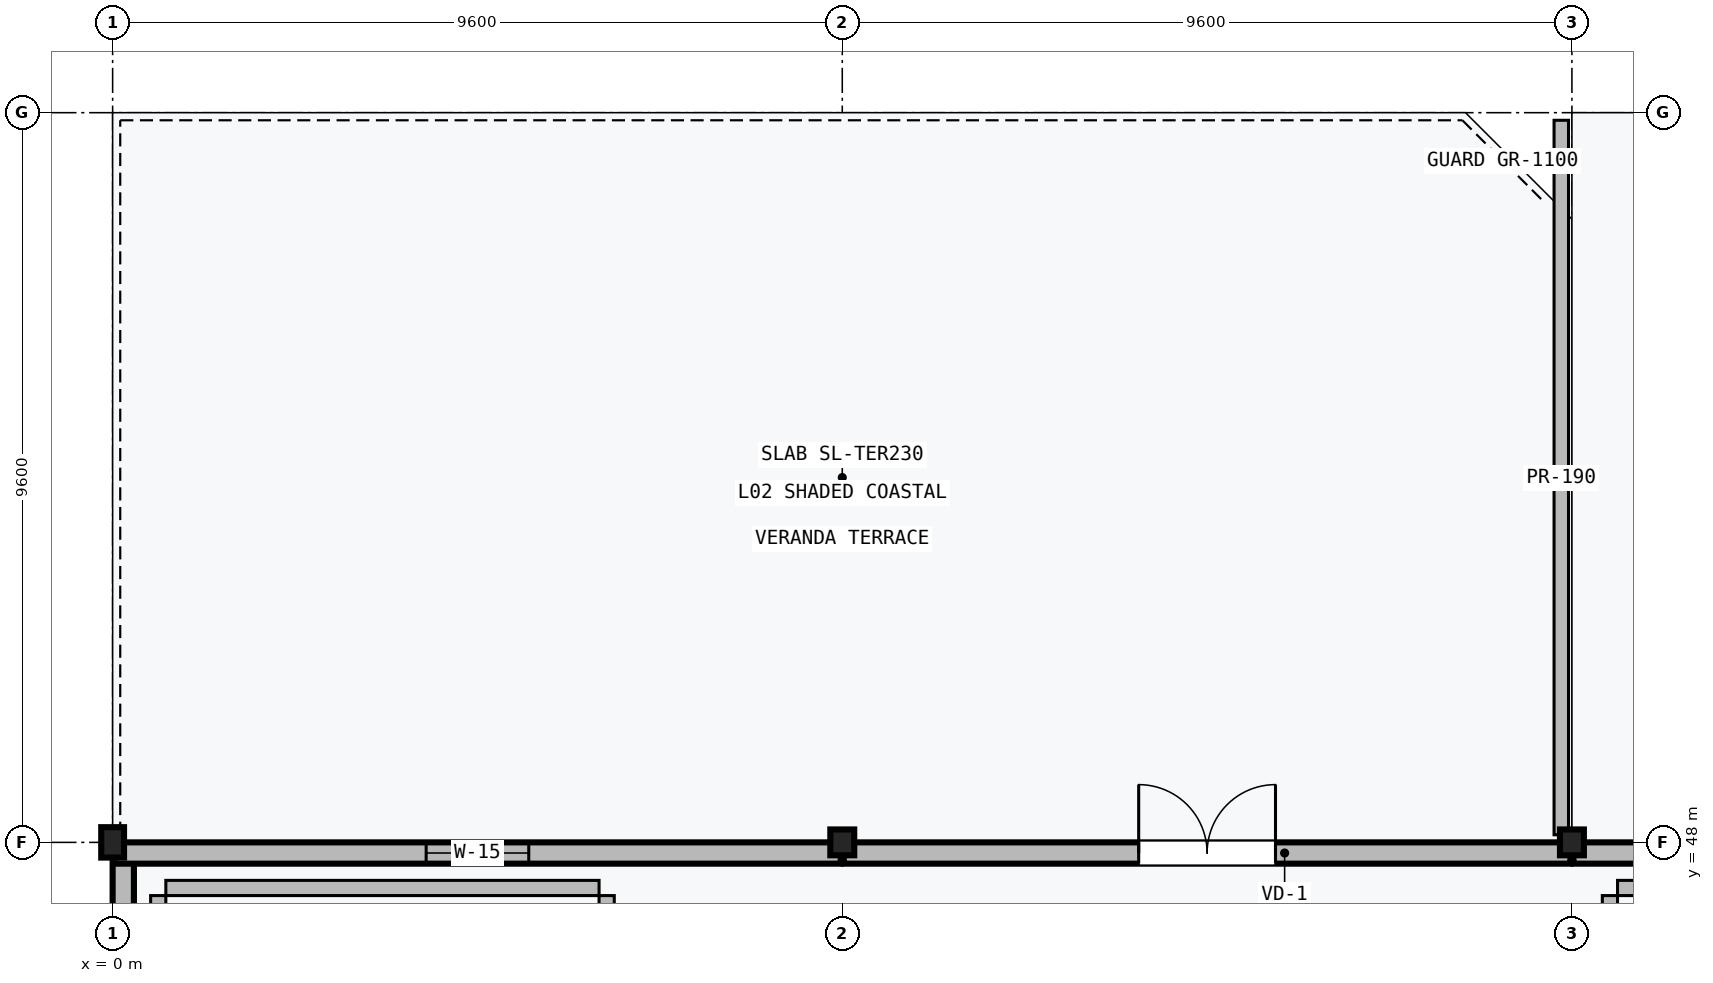
"""IFC4 building model, lengths in metres.
Left out: names, types, materials, properties, quantities, classifications, styles, units other than length and angle.
Written with IfcOpenShell. Run it as: python <this file> out.ifc"""

import sys

from ifc_helpers import new_model, si_unit, direction, frame, frame_2d, origin, origin_2d, place, context, subcontext, project, spatial, rectangle, i_section, extrude, element, fill, save


model = new_model("IFC4")
c1 = context("Model", 3, precision=1e-05, world=origin(), true_north=direction((0.0, 1.0)))
c2 = subcontext(c1, "Body", "Model", "MODEL_VIEW")
j1 = project(units=[si_unit("LENGTHUNIT", "METRE"), si_unit("PLANEANGLEUNIT", "RADIAN")], contexts=[c1])
p1 = place(None, origin())
s1 = spatial("IfcSite", under=j1, at=p1, CompositionType="ELEMENT")
p2 = place(p1, origin())
s2 = spatial("IfcBuilding", under=s1, at=p2, CompositionType="ELEMENT")
p3 = place(p2, frame((0.0, 0.0, 10.5)))
s3 = spatial("IfcBuildingStorey", under=s2, at=p3, CompositionType="ELEMENT", Elevation=10.5)
p4 = place(p3, frame((0.0, 48.0, 0.0), z_axis=(0.0, 0.0, 1.0), x_axis=(1.0, 0.0, 0.0)))
e1 = element("IfcColumn", 1, at=p4, inside=s3, PredefinedType="COLUMN", context=c2, shape_type="SweptSolid", body=[
    extrude(i_section(OverallWidth=0.3, OverallDepth=0.4, WebThickness=0.013, FlangeThickness=0.024, FilletRadius=0.027, at=origin_2d()), origin(), (0.0, 0.0, 1.0), 3.95),
])
for number, where, z_axis, x_axis in (
    (2, (9.6, 48.0, 0.0), (0.0, 0.0, 1.0), (1.0, 0.0, 0.0)),
    (3, (19.2, 48.0, 0.0), (0.0, 0.0, 1.0), (1.0, 0.0, 0.0)),
):
    element("IfcColumn", number, at=place(p3, frame(where, z_axis=z_axis, x_axis=x_axis)), inside=s3, PredefinedType="COLUMN", context=c2, shape_type="SweptSolid", body=[
        extrude(i_section(OverallWidth=0.314, OverallDepth=0.34, WebThickness=0.019, FlangeThickness=0.031, FilletRadius=0.015, at=origin_2d()), origin(), (0.0, 0.0, 1.0), 3.95),
    ])
p5 = place(p3, frame((0.14, 38.42, 0.0), z_axis=(0.0, 0.0, 1.0), x_axis=(0.0, 1.0, 0.0)))
e4 = element("IfcWall", 4, at=p5, inside=s3, PredefinedType="SOLIDWALL", context=c2, shape_type="SweptSolid", body=[
    extrude(rectangle(XDim=9.56, YDim=0.28, at=frame_2d((4.78, 0.0))), origin(), (0.0, 0.0, 1.0), 3.493),
])
p6 = place(p5, frame((4.105, 0.0, 0.9)))
e5 = element("IfcOpeningElement", 5, at=p6, cuts=e4, PredefinedType="OPENING", context=c2, shape_type="SweptSolid", body=[
    extrude(rectangle(XDim=1.35, YDim=1.5, at=frame_2d((0.675, 0.75))), frame((0.0, 0.15, 0.0), z_axis=(0.0, -1.0, 0.0), x_axis=(1.0, 0.0, 0.0)), (0.0, 0.0, 1.0), 0.3),
])
p7 = place(p3, frame((0.02, 47.86, 0.0), z_axis=(0.0, 0.0, 1.0), x_axis=(1.0, 0.0, 0.0)))
e6 = element("IfcWall", 6, at=p7, inside=s3, PredefinedType="SOLIDWALL", context=c2, shape_type="SweptSolid", body=[
    extrude(rectangle(XDim=9.56, YDim=0.28, at=frame_2d((4.78, 0.0))), origin(), (0.0, 0.0, 1.0), 3.66),
])
p8 = place(p7, frame((4.105, 0.0, 0.9)))
e7 = element("IfcOpeningElement", 7, at=p8, cuts=e6, PredefinedType="OPENING", context=c2, shape_type="SweptSolid", body=[
    extrude(rectangle(XDim=1.35, YDim=1.5, at=frame_2d((0.675, 0.75))), frame((0.0, 0.15, 0.0), z_axis=(0.0, -1.0, 0.0), x_axis=(1.0, 0.0, 0.0)), (0.0, 0.0, 1.0), 0.3),
])
p9 = place(p3, frame((9.62, 47.86, 0.0), z_axis=(0.0, 0.0, 1.0), x_axis=(1.0, 0.0, 0.0)))
e8 = element("IfcWall", 8, at=p9, inside=s3, PredefinedType="SOLIDWALL", context=c2, shape_type="SweptSolid", body=[
    extrude(rectangle(XDim=9.56, YDim=0.28, at=frame_2d((4.78, 0.0))), origin(), (0.0, 0.0, 1.0), 3.66),
])
p10 = place(p9, frame((3.88, 0.0, 0.0)))
e9 = element("IfcOpeningElement", 9, at=p10, cuts=e8, PredefinedType="OPENING", context=c2, shape_type="SweptSolid", body=[
    extrude(rectangle(XDim=1.8, YDim=2.2, at=frame_2d((0.9, 1.1))), frame((0.0, 0.15, 0.0), z_axis=(0.0, -1.0, 0.0), x_axis=(1.0, 0.0, 0.0)), (0.0, 0.0, 1.0), 0.3),
])
p11 = place(p3, frame((19.22, 47.86, 0.0), z_axis=(0.0, 0.0, 1.0), x_axis=(1.0, 0.0, 0.0)))
e10 = element("IfcWall", 10, at=p11, inside=s3, PredefinedType="SOLIDWALL", context=c2, shape_type="SweptSolid", body=[
    extrude(rectangle(XDim=9.56, YDim=0.28, at=frame_2d((4.78, 0.0))), origin(), (0.0, 0.0, 1.0), 3.66),
])
p12 = place(p11, frame((3.13, 0.0, 0.9)))
e11 = element("IfcOpeningElement", 11, at=p12, cuts=e10, PredefinedType="OPENING", context=c2, shape_type="SweptSolid", body=[
    extrude(rectangle(XDim=3.3, YDim=2.1, at=frame_2d((1.65, 1.05))), frame((0.0, 0.15, 0.0), z_axis=(0.0, -1.0, 0.0), x_axis=(1.0, 0.0, 0.0)), (0.0, 0.0, 1.0), 0.3),
])
p13 = place(p3, frame((19.06, 48.1, 0.0), z_axis=(0.0, 0.0, 1.0), x_axis=(0.0, 1.0, 0.0)))
e12 = element("IfcWall", 12, at=p13, inside=s3, PredefinedType="PARAPET", context=c2, shape_type="SweptSolid", body=[
    extrude(rectangle(XDim=9.4, YDim=0.19, at=frame_2d((4.7, 0.0))), origin(), (0.0, 0.0, 1.0), 1.105),
])
p14 = place(p3, frame((19.8, 47.4, 0.0), z_axis=(0.0, 0.0, 1.0), x_axis=(1.0, 0.0, 0.0)))
e13 = element("IfcWall", 13, at=p14, inside=s3, PredefinedType="PARTITIONING", context=c2, shape_type="SweptSolid", body=[
    extrude(rectangle(XDim=8.4, YDim=0.2, at=frame_2d((4.2, 0.0))), origin(), (0.0, 0.0, 1.0), 3.59),
])
p15 = place(p3, frame((19.7, 19.8, 0.0), z_axis=(0.0, 0.0, 1.0), x_axis=(0.0, 1.0, 0.0)))
e14 = element("IfcWall", 14, at=p15, inside=s3, PredefinedType="PARTITIONING", context=c2, shape_type="SweptSolid", body=[
    extrude(rectangle(XDim=27.5, YDim=0.2, at=frame_2d((13.75, 0.0))), origin(), (0.0, 0.0, 1.0), 3.333),
])
p16 = place(p15, frame((3.6, 0.0, 0.0)))
e15 = element("IfcOpeningElement", 15, at=p16, cuts=e14, PredefinedType="OPENING", context=c2, shape_type="SweptSolid", body=[
    extrude(rectangle(XDim=1.7, YDim=2.3, at=frame_2d((0.85, 1.15))), frame((0.0, 0.11, 0.0), z_axis=(0.0, -1.0, 0.0), x_axis=(1.0, 0.0, 0.0)), (0.0, 0.0, 1.0), 0.22),
])
p17 = place(p3, frame((0.7, 47.4, 0.0), z_axis=(0.0, 0.0, 1.0), x_axis=(1.0, 0.0, 0.0)))
e16 = element("IfcWall", 16, at=p17, inside=s3, PredefinedType="PARTITIONING", context=c2, shape_type="SweptSolid", body=[
    extrude(rectangle(XDim=5.7, YDim=0.2, at=frame_2d((2.85, 0.0))), origin(), (0.0, 0.0, 1.0), 3.59),
])
p18 = place(p3, frame((0.6, 19.8, 0.0), z_axis=(0.0, 0.0, 1.0), x_axis=(0.0, 1.0, 0.0)))
e17 = element("IfcWall", 17, at=p18, inside=s3, PredefinedType="PARTITIONING", context=c2, shape_type="SweptSolid", body=[
    extrude(rectangle(XDim=27.5, YDim=0.2, at=frame_2d((13.75, 0.0))), origin(), (0.0, 0.0, 1.0), 3.333),
])
p19 = place(p3, frame((6.5, 47.3, 0.0), z_axis=(0.0, 0.0, 1.0), x_axis=(0.0, -1.0, 0.0)))
e18 = element("IfcWall", 18, at=p19, inside=s3, PredefinedType="PARTITIONING", context=c2, shape_type="SweptSolid", body=[
    extrude(rectangle(XDim=27.5, YDim=0.2, at=frame_2d((13.75, 0.0))), origin(), (0.0, 0.0, 1.0), 3.333),
])
p20 = place(p19, frame((3.6, 0.0, 0.0)))
e19 = element("IfcOpeningElement", 19, at=p20, cuts=e18, PredefinedType="OPENING", context=c2, shape_type="SweptSolid", body=[
    extrude(rectangle(XDim=1.15, YDim=2.2, at=frame_2d((0.575, 1.1))), frame((0.0, 0.11, 0.0), z_axis=(0.0, -1.0, 0.0), x_axis=(1.0, 0.0, 0.0)), (0.0, 0.0, 1.0), 0.22),
])
p21 = place(p8, origin())
e20 = element("IfcWindow", 20, at=p21, inside=s3, PartitioningType="SINGLE_PANEL", PredefinedType="WINDOW", context=c2, shape_type="SweptSolid", body=[
    extrude(rectangle(XDim=1.35, YDim=1.5, at=frame_2d((0.675, 0.75))), frame((0.0, 0.03, 0.0), z_axis=(0.0, -1.0, 0.0), x_axis=(1.0, 0.0, 0.0)), (0.0, 0.0, 1.0), 0.06),
])
fill(e7, e20)
p22 = place(p10, origin())
e21 = element("IfcDoor", 21, at=p22, inside=s3, OperationType="DOUBLE_DOOR_SINGLE_SWING", PredefinedType="DOOR", context=c2, shape_type="SweptSolid", body=[
    extrude(rectangle(XDim=1.8, YDim=2.2, at=frame_2d((0.9, 1.1))), frame((0.0, 0.025, 0.0), z_axis=(0.0, -1.0, 0.0), x_axis=(1.0, 0.0, 0.0)), (0.0, 0.0, 1.0), 0.05),
])
fill(e9, e21)
save(model, sys.argv[1])
